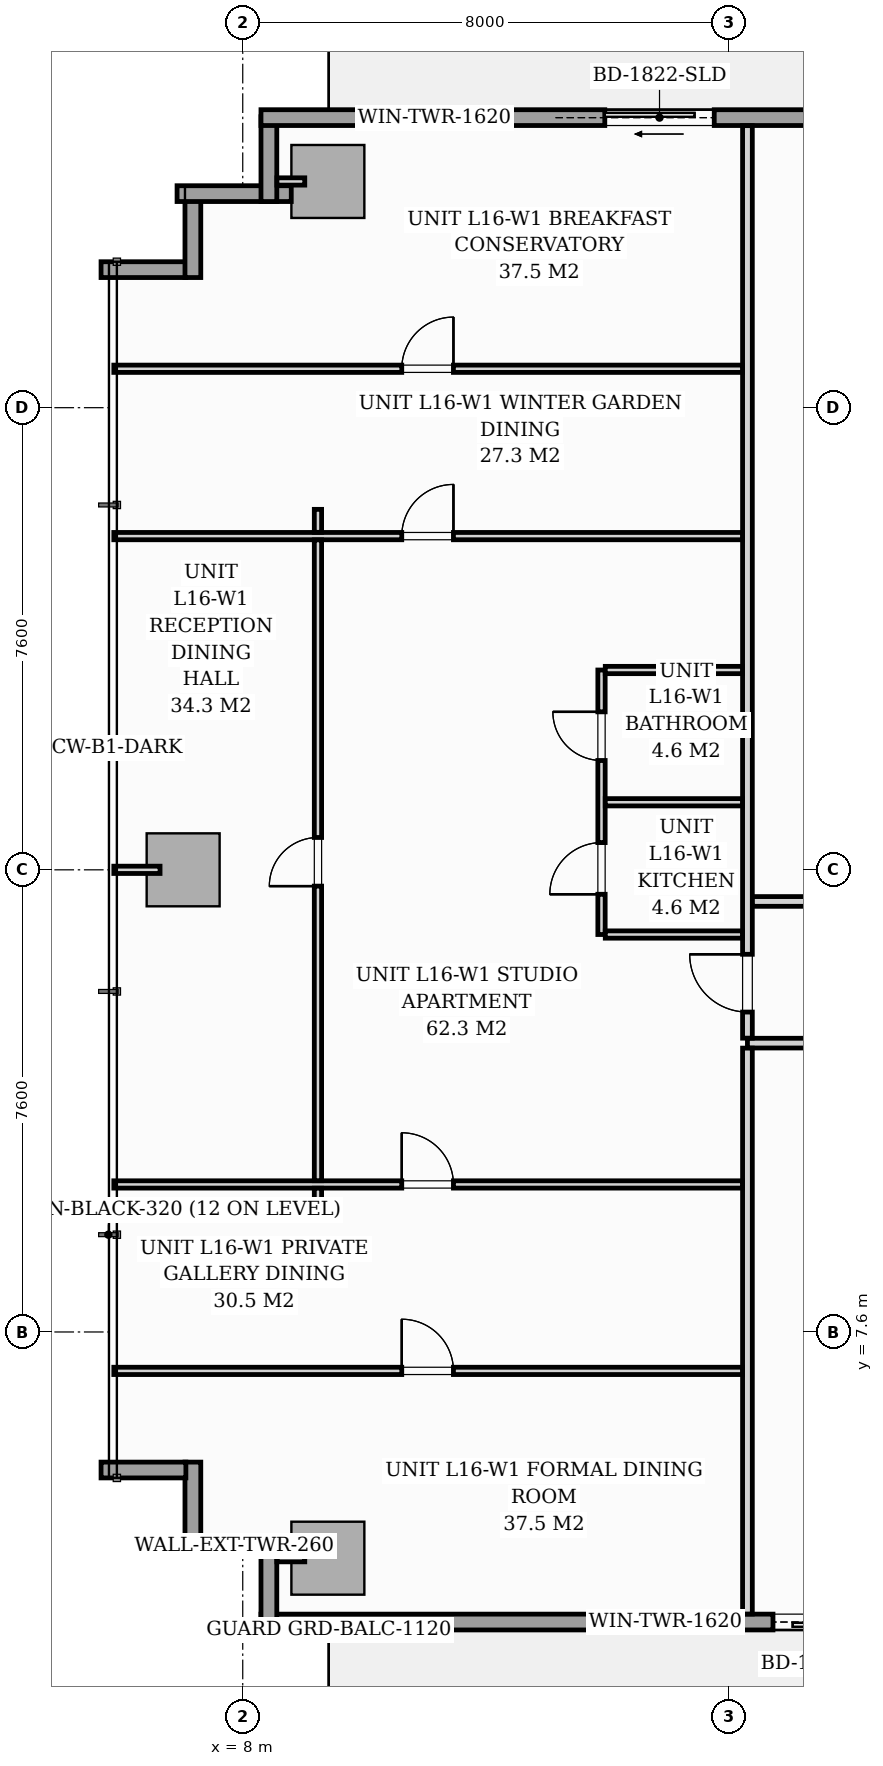
"""IFC4 building model, lengths in metres.
Left out: names, types, materials, properties, quantities, classifications, styles, units other than length and angle.
Written with IfcOpenShell. Run it as: python <this file> out.ifc"""

import sys

from ifc_helpers import new_model, si_unit, direction, frame, frame_2d, origin, origin_2d, place, context, subcontext, project, spatial, rectangle, extrude, source, transform, mapped, element, fill, save


model = new_model("IFC4")
c1 = context("Model", 3, precision=1e-05, world=origin(), true_north=direction((0.0, 1.0)))
c2 = subcontext(c1, "Body", "Model", "MODEL_VIEW")
j1 = project(units=[si_unit("LENGTHUNIT", "METRE"), si_unit("PLANEANGLEUNIT", "RADIAN")], contexts=[c1])
p1 = place(None, origin())
s1 = spatial("IfcSite", under=j1, at=p1, CompositionType="ELEMENT")
p2 = place(p1, origin())
s2 = spatial("IfcBuilding", under=s1, at=p2, CompositionType="ELEMENT")
p3 = place(p2, frame((0.0, 0.0, 58.2)))
s3 = spatial("IfcBuildingStorey", under=s2, at=p3, CompositionType="ELEMENT", Elevation=58.2)
m1 = source(origin(), c2, "Body", "SweptSolid", [
    extrude(rectangle(XDim=1.2, YDim=1.2, at=origin_2d()), origin(), (0.0, 0.0, 1.0), 3.196),
])
for number, where, z_axis, x_axis in (
    (1, (9.4, 3.88, 0.002), (0.0, 0.0, 1.0), (1.0, 0.0, 0.0)),
    (2, (9.4, 26.52, 0.002), (0.0, 0.0, 1.0), (1.0, 0.0, 0.0)),
    (3, (7.02, 15.2, 0.002), (0.0, 0.0, 1.0), (1.0, 0.0, 0.0)),
):
    element("IfcColumn", number, at=place(p3, frame(where, z_axis=z_axis, x_axis=x_axis)), inside=s3, PredefinedType="COLUMN", context=c2, shape_type="MappedRepresentation", body=[
        mapped(m1, transform((0.0, 0.0, 0.0), scale=1.0)),
    ])
p4 = place(p3, frame((8.798, 4.08, 0.0), z_axis=(0.0, 0.0, 1.0), x_axis=(-1.0, 0.0, 0.0)))
e4 = element("IfcWall", 4, at=p4, inside=s3, PredefinedType="STANDARD", context=c2, shape_type="SweptSolid", body=[
    extrude(rectangle(XDim=1.878, YDim=0.26, at=frame_2d((0.939, 0.0))), origin(), (0.0, 0.0, 1.0), 2.94),
])
for number, where, z_axis, x_axis in (
    (5, (7.18, 4.065, 0.0), (0.0, 0.0, 1.0), (0.0, 1.0, 0.0)),
    (6, (7.065, 5.33, 0.0), (0.0, 0.0, 1.0), (-1.0, 0.0, 0.0)),
    (7, (5.67, 25.07, 0.0), (0.0, 0.0, 1.0), (1.0, 0.0, 0.0)),
    (8, (7.18, 24.94, 0.0), (0.0, 0.0, 1.0), (0.0, 1.0, 0.0)),
):
    element("IfcWall", number, at=place(p3, frame(where, z_axis=z_axis, x_axis=x_axis)), inside=s3, PredefinedType="STANDARD", context=c2, shape_type="SweptSolid", body=[
        extrude(rectangle(XDim=1.395, YDim=0.26, at=frame_2d((0.698, 0.0))), origin(), (0.0, 0.0, 1.0), 2.94),
    ])
p5 = place(p3, frame((6.92, 26.32, 0.0), z_axis=(0.0, 0.0, 1.0), x_axis=(1.0, 0.0, 0.0)))
e9 = element("IfcWall", 9, at=p5, inside=s3, PredefinedType="STANDARD", context=c2, shape_type="SweptSolid", body=[
    extrude(rectangle(XDim=1.878, YDim=0.26, at=frame_2d((0.939, 0.0))), origin(), (0.0, 0.0, 1.0), 2.94),
])
p6 = place(p3, frame((8.43, 26.19, 0.0), z_axis=(0.0, 0.0, 1.0), x_axis=(0.0, 1.0, 0.0)))
e10 = element("IfcWall", 10, at=p6, inside=s3, PredefinedType="STANDARD", context=c2, shape_type="SweptSolid", body=[
    extrude(rectangle(XDim=1.395, YDim=0.26, at=frame_2d((0.698, 0.0))), origin(), (0.0, 0.0, 1.0), 2.94),
])
p7 = place(p3, frame((8.3, 27.57, 0.0), z_axis=(0.0, 0.0, 1.0), x_axis=(1.0, 0.0, 0.0)))
e11 = element("IfcWall", 11, at=p7, inside=s3, PredefinedType="STANDARD", context=c2, shape_type="SweptSolid", body=[
    extrude(rectangle(XDim=17.15, YDim=0.26, at=frame_2d((8.575, 0.0))), origin(), (0.0, 0.0, 1.0), 2.94),
])
p8 = place(p7, frame((5.654, 0.0, 0.0)))
e12 = element("IfcOpeningElement", 12, at=p8, cuts=e11, PredefinedType="OPENING", context=c2, shape_type="SweptSolid", body=[
    extrude(rectangle(XDim=1.8, YDim=2.06, at=frame_2d((0.9, 1.03))), frame((0.0, 0.14, 0.0), z_axis=(0.0, -1.0, 0.0), x_axis=(1.0, 0.0, 0.0)), (0.0, 0.0, 1.0), 0.28),
])
p9 = place(p7, frame((2.05, 0.0, 0.65)))
e13 = element("IfcOpeningElement", 13, at=p9, cuts=e11, PredefinedType="OPENING", context=c2, shape_type="SweptSolid", body=[
    extrude(rectangle(XDim=1.6, YDim=1.5, at=frame_2d((0.8, 0.75))), frame((0.0, 0.14, 0.0), z_axis=(0.0, -1.0, 0.0), x_axis=(1.0, 0.0, 0.0)), (0.0, 0.0, 1.0), 0.28),
])
p10 = place(p3, frame((25.45, 2.83, 0.0), z_axis=(0.0, 0.0, 1.0), x_axis=(-1.0, 0.0, 0.0)))
e14 = element("IfcWall", 14, at=p10, inside=s3, PredefinedType="STANDARD", context=c2, shape_type="SweptSolid", body=[
    extrude(rectangle(XDim=17.15, YDim=0.26, at=frame_2d((8.575, 0.0))), origin(), (0.0, 0.0, 1.0), 2.94),
])
p11 = place(p10, frame((6.93, 0.0, 0.0)))
e15 = element("IfcOpeningElement", 15, at=p11, cuts=e14, PredefinedType="OPENING", context=c2, shape_type="SweptSolid", body=[
    extrude(rectangle(XDim=1.8, YDim=2.06, at=frame_2d((0.9, 1.03))), frame((0.0, 0.14, 0.0), z_axis=(0.0, -1.0, 0.0), x_axis=(1.0, 0.0, 0.0)), (0.0, 0.0, 1.0), 0.28),
])
p12 = place(p10, frame((9.7, 0.0, 0.65)))
e16 = element("IfcOpeningElement", 16, at=p12, cuts=e14, PredefinedType="OPENING", context=c2, shape_type="SweptSolid", body=[
    extrude(rectangle(XDim=1.6, YDim=1.5, at=frame_2d((0.8, 0.75))), frame((0.0, 0.14, 0.0), z_axis=(0.0, -1.0, 0.0), x_axis=(1.0, 0.0, 0.0)), (0.0, 0.0, 1.0), 0.28),
])
p13 = place(p3, frame((8.43, 2.815, 0.0), z_axis=(0.0, 0.0, 1.0), x_axis=(0.0, 1.0, 0.0)))
e17 = element("IfcWall", 17, at=p13, inside=s3, PredefinedType="STANDARD", context=c2, shape_type="SweptSolid", body=[
    extrude(rectangle(XDim=1.395, YDim=0.26, at=frame_2d((0.698, 0.0))), origin(), (0.0, 0.0, 1.0), 2.94),
])
p14 = place(p3, frame((16.3, 12.35, 0.0), z_axis=(0.0, 0.0, 1.0), x_axis=(1.0, 0.0, 0.0)))
e18 = element("IfcWall", 18, at=p14, inside=s3, PredefinedType="PARTITIONING", context=c2, shape_type="SweptSolid", body=[
    extrude(rectangle(XDim=35.2, YDim=0.16, at=frame_2d((17.6, 0.0))), origin(), (0.0, 0.0, 1.0), 2.94),
])
p15 = place(p14, frame((6.307, 0.0, 0.0)))
e19 = element("IfcOpeningElement", 19, at=p15, cuts=e18, PredefinedType="OPENING", context=c2, shape_type="SweptSolid", body=[
    extrude(rectangle(XDim=0.95, YDim=2.06, at=frame_2d((0.475, 1.03))), frame((0.0, 0.09, 0.0), z_axis=(0.0, -1.0, 0.0), x_axis=(1.0, 0.0, 0.0)), (0.0, 0.0, 1.0), 0.18),
])
p16 = place(p14, frame((18.392, 0.0, 0.0)))
e20 = element("IfcOpeningElement", 20, at=p16, cuts=e18, PredefinedType="OPENING", context=c2, shape_type="SweptSolid", body=[
    extrude(rectangle(XDim=0.95, YDim=2.06, at=frame_2d((0.475, 1.03))), frame((0.0, 0.09, 0.0), z_axis=(0.0, -1.0, 0.0), x_axis=(1.0, 0.0, 0.0)), (0.0, 0.0, 1.0), 0.18),
])
p17 = place(p14, frame((29.304, 0.0, 0.0)))
e21 = element("IfcOpeningElement", 21, at=p17, cuts=e18, PredefinedType="OPENING", context=c2, shape_type="SweptSolid", body=[
    extrude(rectangle(XDim=0.95, YDim=2.06, at=frame_2d((0.475, 1.03))), frame((0.0, 0.09, 0.0), z_axis=(0.0, -1.0, 0.0), x_axis=(1.0, 0.0, 0.0)), (0.0, 0.0, 1.0), 0.18),
])
p18 = place(p3, frame((16.3, 2.962, 0.0), z_axis=(0.0, 0.0, 1.0), x_axis=(0.0, 1.0, 0.0)))
e22 = element("IfcWall", 22, at=p18, inside=s3, PredefinedType="PARTITIONING", context=c2, shape_type="SweptSolid", body=[
    extrude(rectangle(XDim=9.306, YDim=0.16, at=frame_2d((4.653, 0.0))), origin(), (0.0, 0.0, 1.0), 2.94),
])
p19 = place(p3, frame((16.3, 12.432, 0.0), z_axis=(0.0, 0.0, 1.0), x_axis=(0.0, 1.0, 0.0)))
e23 = element("IfcWall", 23, at=p19, inside=s3, PredefinedType="PARTITIONING", context=c2, shape_type="SweptSolid", body=[
    extrude(rectangle(XDim=15.006, YDim=0.16, at=frame_2d((7.503, 0.0))), origin(), (0.0, 0.0, 1.0), 2.94),
])
p20 = place(p19, frame((0.429, 0.0, 0.0)))
e24 = element("IfcOpeningElement", 24, at=p20, cuts=e23, PredefinedType="OPENING", context=c2, shape_type="SweptSolid", body=[
    extrude(rectangle(XDim=0.95, YDim=2.06, at=frame_2d((0.475, 1.03))), frame((0.0, 0.09, 0.0), z_axis=(0.0, -1.0, 0.0), x_axis=(1.0, 0.0, 0.0)), (0.0, 0.0, 1.0), 0.18),
])
p21 = place(p3, frame((13.9, 14.136, 0.0), z_axis=(0.0, 0.0, 1.0), x_axis=(0.0, 1.0, 0.0)))
e25 = element("IfcWall", 25, at=p21, inside=s3, PredefinedType="PARTITIONING", context=c2, shape_type="SweptSolid", body=[
    extrude(rectangle(XDim=4.35, YDim=0.12, at=frame_2d((2.175, 0.0))), origin(), (0.0, 0.0, 1.0), 2.94),
])
p22 = place(p21, frame((0.662, 0.0, 0.0)))
e26 = element("IfcOpeningElement", 26, at=p22, cuts=e25, PredefinedType="OPENING", context=c2, shape_type="SweptSolid", body=[
    extrude(rectangle(XDim=0.85, YDim=2.05, at=frame_2d((0.425, 1.025))), frame((0.0, 0.07, 0.0), z_axis=(0.0, -1.0, 0.0), x_axis=(1.0, 0.0, 0.0)), (0.0, 0.0, 1.0), 0.14),
])
p23 = place(p21, frame((2.862, 0.0, 0.0)))
e27 = element("IfcOpeningElement", 27, at=p23, cuts=e25, PredefinedType="OPENING", context=c2, shape_type="SweptSolid", body=[
    extrude(rectangle(XDim=0.8, YDim=2.02, at=frame_2d((0.4, 1.01))), frame((0.0, 0.07, 0.0), z_axis=(0.0, -1.0, 0.0), x_axis=(1.0, 0.0, 0.0)), (0.0, 0.0, 1.0), 0.14),
])
p24 = place(p3, frame((13.962, 16.311, 0.0), z_axis=(0.0, 0.0, 1.0), x_axis=(1.0, 0.0, 0.0)))
e28 = element("IfcWall", 28, at=p24, inside=s3, PredefinedType="PARTITIONING", context=c2, shape_type="SweptSolid", body=[
    extrude(rectangle(XDim=2.256, YDim=0.12, at=frame_2d((1.128, 0.0))), origin(), (0.0, 0.0, 1.0), 2.045),
])
for number, where, z_axis, x_axis in (
    (29, (13.962, 14.136, 0.0), (0.0, 0.0, 1.0), (1.0, 0.0, 0.0)),
    (30, (13.962, 18.486, 0.0), (0.0, 0.0, 1.0), (1.0, 0.0, 0.0)),
):
    element("IfcWall", number, at=place(p3, frame(where, z_axis=z_axis, x_axis=x_axis)), inside=s3, PredefinedType="PARTITIONING", context=c2, shape_type="SweptSolid", body=[
        extrude(rectangle(XDim=2.256, YDim=0.12, at=frame_2d((1.128, 0.0))), origin(), (0.0, 0.0, 1.0), 2.94),
    ])
p25 = place(p3, frame((5.88, 6.96, 0.0), z_axis=(0.0, 0.0, 1.0), x_axis=(1.0, 0.0, 0.0)))
e31 = element("IfcWall", 31, at=p25, inside=s3, PredefinedType="PARTITIONING", context=c2, shape_type="SweptSolid", body=[
    extrude(rectangle(XDim=10.338, YDim=0.12, at=frame_2d((5.169, 0.0))), origin(), (0.0, 0.0, 1.0), 2.94),
])
p26 = place(p25, frame((4.735, 0.0, 0.0)))
e32 = element("IfcOpeningElement", 32, at=p26, cuts=e31, PredefinedType="OPENING", context=c2, shape_type="SweptSolid", body=[
    extrude(rectangle(XDim=0.85, YDim=2.05, at=frame_2d((0.425, 1.025))), frame((0.0, 0.07, 0.0), z_axis=(0.0, -1.0, 0.0), x_axis=(1.0, 0.0, 0.0)), (0.0, 0.0, 1.0), 0.14),
])
p27 = place(p3, frame((5.88, 23.44, 0.0), z_axis=(0.0, 0.0, 1.0), x_axis=(1.0, 0.0, 0.0)))
e33 = element("IfcWall", 33, at=p27, inside=s3, PredefinedType="PARTITIONING", context=c2, shape_type="SweptSolid", body=[
    extrude(rectangle(XDim=10.338, YDim=0.12, at=frame_2d((5.169, 0.0))), origin(), (0.0, 0.0, 1.0), 2.94),
])
p28 = place(p27, frame((4.735, 0.0, 0.0)))
e34 = element("IfcOpeningElement", 34, at=p28, cuts=e33, PredefinedType="OPENING", context=c2, shape_type="SweptSolid", body=[
    extrude(rectangle(XDim=0.85, YDim=2.05, at=frame_2d((0.425, 1.025))), frame((0.0, 0.07, 0.0), z_axis=(0.0, -1.0, 0.0), x_axis=(1.0, 0.0, 0.0)), (0.0, 0.0, 1.0), 0.14),
])
p29 = place(p3, frame((5.88, 10.026, 0.0), z_axis=(0.0, 0.0, 1.0), x_axis=(1.0, 0.0, 0.0)))
e35 = element("IfcWall", 35, at=p29, inside=s3, PredefinedType="PARTITIONING", context=c2, shape_type="SweptSolid", body=[
    extrude(rectangle(XDim=10.338, YDim=0.12, at=frame_2d((5.169, 0.0))), origin(), (0.0, 0.0, 1.0), 2.94),
])
p30 = place(p29, frame((4.735, 0.0, 0.0)))
e36 = element("IfcOpeningElement", 36, at=p30, cuts=e35, PredefinedType="OPENING", context=c2, shape_type="SweptSolid", body=[
    extrude(rectangle(XDim=0.85, YDim=2.05, at=frame_2d((0.425, 1.025))), frame((0.0, 0.07, 0.0), z_axis=(0.0, -1.0, 0.0), x_axis=(1.0, 0.0, 0.0)), (0.0, 0.0, 1.0), 0.14),
])
p31 = place(p3, frame((5.88, 20.688, 0.0), z_axis=(0.0, 0.0, 1.0), x_axis=(1.0, 0.0, 0.0)))
e37 = element("IfcWall", 37, at=p31, inside=s3, PredefinedType="PARTITIONING", context=c2, shape_type="SweptSolid", body=[
    extrude(rectangle(XDim=10.338, YDim=0.12, at=frame_2d((5.169, 0.0))), origin(), (0.0, 0.0, 1.0), 2.94),
])
p32 = place(p31, frame((4.735, 0.0, 0.0)))
e38 = element("IfcOpeningElement", 38, at=p32, cuts=e37, PredefinedType="OPENING", context=c2, shape_type="SweptSolid", body=[
    extrude(rectangle(XDim=0.85, YDim=2.05, at=frame_2d((0.425, 1.025))), frame((0.0, 0.07, 0.0), z_axis=(0.0, -1.0, 0.0), x_axis=(1.0, 0.0, 0.0)), (0.0, 0.0, 1.0), 0.14),
])
p33 = place(p3, frame((9.237, 9.586, 0.0), z_axis=(0.0, 0.0, 1.0), x_axis=(0.0, 1.0, 0.0)))
e39 = element("IfcWall", 39, at=p33, inside=s3, PredefinedType="PARTITIONING", context=c2, shape_type="SweptSolid", body=[
    extrude(rectangle(XDim=0.378, YDim=0.12, at=frame_2d((0.189, 0.0))), origin(), (0.0, 0.0, 1.0), 2.94),
])
p34 = place(p3, frame((9.237, 10.088, 0.0), z_axis=(0.0, 0.0, 1.0), x_axis=(0.0, 1.0, 0.0)))
e40 = element("IfcWall", 40, at=p34, inside=s3, PredefinedType="PARTITIONING", context=c2, shape_type="SweptSolid", body=[
    extrude(rectangle(XDim=10.538, YDim=0.12, at=frame_2d((5.269, 0.0))), origin(), (0.0, 0.0, 1.0), 2.94),
])
p35 = place(p34, frame((4.844, 0.0, 0.0)))
e41 = element("IfcOpeningElement", 41, at=p35, cuts=e40, PredefinedType="OPENING", context=c2, shape_type="SweptSolid", body=[
    extrude(rectangle(XDim=0.8, YDim=2.0, at=frame_2d((0.4, 1.0))), frame((0.0, 0.07, 0.0), z_axis=(0.0, -1.0, 0.0), x_axis=(1.0, 0.0, 0.0)), (0.0, 0.0, 1.0), 0.14),
])
p36 = place(p3, frame((9.237, 20.75, 0.0), z_axis=(0.0, 0.0, 1.0), x_axis=(0.0, 1.0, 0.0)))
e42 = element("IfcWall", 42, at=p36, inside=s3, PredefinedType="PARTITIONING", context=c2, shape_type="SweptSolid", body=[
    extrude(rectangle(XDim=0.378, YDim=0.12, at=frame_2d((0.189, 0.0))), origin(), (0.0, 0.0, 1.0), 2.94),
])
p37 = place(p3, frame((16.382, 14.68, 0.0), z_axis=(0.0, 0.0, 1.0), x_axis=(1.0, 0.0, 0.0)))
e43 = element("IfcWall", 43, at=p37, inside=s3, PredefinedType="PARTITIONING", context=c2, shape_type="SweptSolid", body=[
    extrude(rectangle(XDim=9.778, YDim=0.16, at=frame_2d((4.889, 0.0))), origin(), (0.0, 0.0, 1.0), 2.94),
])
p38 = place(p37, frame((4.313, 0.0, 0.0)))
e44 = element("IfcOpeningElement", 44, at=p38, cuts=e43, PredefinedType="OPENING", context=c2, shape_type="SweptSolid", body=[
    extrude(rectangle(XDim=0.95, YDim=2.06, at=frame_2d((0.475, 1.03))), frame((0.0, 0.09, 0.0), z_axis=(0.0, -1.0, 0.0), x_axis=(1.0, 0.0, 0.0)), (0.0, 0.0, 1.0), 0.18),
])
for number, where, z_axis, x_axis in (
    (45, (9.02, 3.88, 0.0), (0.0, 0.0, 1.0), (-1.0, 0.0, 0.0)),
    (46, (9.02, 26.52, 0.0), (0.0, 0.0, 1.0), (-1.0, 0.0, 0.0)),
):
    element("IfcWall", number, at=place(p3, frame(where, z_axis=z_axis, x_axis=x_axis)), inside=s3, PredefinedType="PARTITIONING", context=c2, shape_type="SweptSolid", body=[
        extrude(rectangle(XDim=0.458, YDim=0.12, at=frame_2d((0.229, 0.0))), origin(), (0.0, 0.0, 1.0), 2.94),
    ])
p39 = place(p3, frame((6.64, 15.2, 0.0), z_axis=(0.0, 0.0, 1.0), x_axis=(-1.0, 0.0, 0.0)))
e47 = element("IfcWall", 47, at=p39, inside=s3, PredefinedType="PARTITIONING", context=c2, shape_type="SweptSolid", body=[
    extrude(rectangle(XDim=0.76, YDim=0.12, at=frame_2d((0.38, 0.0))), origin(), (0.0, 0.0, 1.0), 2.94),
])
m2 = source(origin(), c2, "Body", "SweptSolid", [
    extrude(rectangle(XDim=1.8, YDim=2.06, at=frame_2d((0.9, 1.03))), frame((0.0, 0.025, 0.0), z_axis=(0.0, -1.0, 0.0), x_axis=(1.0, 0.0, 0.0)), (0.0, 0.0, 1.0), 0.05),
])
p40 = place(p8, origin())
e48 = element("IfcDoor", 48, at=p40, inside=s3, OperationType="SLIDING_TO_LEFT", PredefinedType="DOOR", context=c2, shape_type="MappedRepresentation", body=[
    mapped(m2, transform((0.0, 0.0, 0.0), scale=1.0)),
])
fill(e12, e48)
m3 = source(origin(), c2, "Body", "SweptSolid", [
    extrude(rectangle(XDim=1.6, YDim=1.5, at=frame_2d((0.8, 0.75))), frame((0.0, 0.03, 0.0), z_axis=(0.0, -1.0, 0.0), x_axis=(1.0, 0.0, 0.0)), (0.0, 0.0, 1.0), 0.06),
])
p41 = place(p9, origin())
e49 = element("IfcWindow", 49, at=p41, inside=s3, PartitioningType="SINGLE_PANEL", PredefinedType="WINDOW", context=c2, shape_type="MappedRepresentation", body=[
    mapped(m3, transform((0.0, 0.0, 0.0), scale=1.0)),
])
fill(e13, e49)
p42 = place(p11, origin())
e50 = element("IfcDoor", 50, at=p42, inside=s3, OperationType="SLIDING_TO_LEFT", PredefinedType="DOOR", context=c2, shape_type="MappedRepresentation", body=[
    mapped(m2, transform((0.0, 0.0, 0.0), scale=1.0)),
])
fill(e15, e50)
p43 = place(p12, origin())
e51 = element("IfcWindow", 51, at=p43, inside=s3, PartitioningType="SINGLE_PANEL", PredefinedType="WINDOW", context=c2, shape_type="MappedRepresentation", body=[
    mapped(m3, transform((0.0, 0.0, 0.0), scale=1.0)),
])
fill(e16, e51)
m4 = source(origin(), c2, "Body", "SweptSolid", [
    extrude(rectangle(XDim=0.95, YDim=2.06, at=frame_2d((0.475, 1.03))), frame((0.0, 0.025, 0.0), z_axis=(0.0, -1.0, 0.0), x_axis=(1.0, 0.0, 0.0)), (0.0, 0.0, 1.0), 0.05),
])
p44 = place(p20, origin())
e52 = element("IfcDoor", 52, at=p44, inside=s3, OperationType="SINGLE_SWING_RIGHT", PredefinedType="DOOR", context=c2, shape_type="MappedRepresentation", body=[
    mapped(m4, transform((0.0, 0.0, 0.0), scale=1.0)),
])
fill(e24, e52)
m5 = source(origin(), c2, "Body", "SweptSolid", [
    extrude(rectangle(XDim=0.85, YDim=2.05, at=frame_2d((0.425, 1.025))), frame((0.0, 0.025, 0.0), z_axis=(0.0, -1.0, 0.0), x_axis=(1.0, 0.0, 0.0)), (0.0, 0.0, 1.0), 0.05),
])
p45 = place(p22, origin())
e53 = element("IfcDoor", 53, at=p45, inside=s3, OperationType="SINGLE_SWING_LEFT", PredefinedType="DOOR", context=c2, shape_type="MappedRepresentation", body=[
    mapped(m5, transform((0.0, 0.0, 0.0), scale=1.0)),
])
fill(e26, e53)
m6 = source(origin(), c2, "Body", "SweptSolid", [
    extrude(rectangle(XDim=0.8, YDim=2.02, at=frame_2d((0.4, 1.01))), frame((0.0, 0.025, 0.0), z_axis=(0.0, -1.0, 0.0), x_axis=(1.0, 0.0, 0.0)), (0.0, 0.0, 1.0), 0.05),
])
p46 = place(p23, origin())
e54 = element("IfcDoor", 54, at=p46, inside=s3, OperationType="SINGLE_SWING_RIGHT", PredefinedType="DOOR", context=c2, shape_type="MappedRepresentation", body=[
    mapped(m6, transform((0.0, 0.0, 0.0), scale=1.0)),
])
fill(e27, e54)
p47 = place(p26, origin())
e55 = element("IfcDoor", 55, at=p47, inside=s3, OperationType="SINGLE_SWING_LEFT", PredefinedType="DOOR", context=c2, shape_type="MappedRepresentation", body=[
    mapped(m5, transform((0.0, 0.0, 0.0), scale=1.0)),
])
fill(e32, e55)
p48 = place(p28, origin())
e56 = element("IfcDoor", 56, at=p48, inside=s3, OperationType="SINGLE_SWING_RIGHT", PredefinedType="DOOR", context=c2, shape_type="MappedRepresentation", body=[
    mapped(m5, transform((0.0, 0.0, 0.0), scale=1.0)),
])
fill(e34, e56)
p49 = place(p30, origin())
e57 = element("IfcDoor", 57, at=p49, inside=s3, OperationType="SINGLE_SWING_LEFT", PredefinedType="DOOR", context=c2, shape_type="MappedRepresentation", body=[
    mapped(m5, transform((0.0, 0.0, 0.0), scale=1.0)),
])
fill(e36, e57)
p50 = place(p32, origin())
e58 = element("IfcDoor", 58, at=p50, inside=s3, OperationType="SINGLE_SWING_RIGHT", PredefinedType="DOOR", context=c2, shape_type="MappedRepresentation", body=[
    mapped(m5, transform((0.0, 0.0, 0.0), scale=1.0)),
])
fill(e38, e58)
m7 = source(origin(), c2, "Body", "SweptSolid", [
    extrude(rectangle(XDim=0.8, YDim=2.0, at=frame_2d((0.4, 1.0))), frame((0.0, 0.025, 0.0), z_axis=(0.0, -1.0, 0.0), x_axis=(1.0, 0.0, 0.0)), (0.0, 0.0, 1.0), 0.05),
])
p51 = place(p35, origin())
e59 = element("IfcDoor", 59, at=p51, inside=s3, OperationType="SINGLE_SWING_LEFT", PredefinedType="DOOR", context=c2, shape_type="MappedRepresentation", body=[
    mapped(m7, transform((0.0, 0.0, 0.0), scale=1.0)),
])
fill(e41, e59)
save(model, sys.argv[1])
